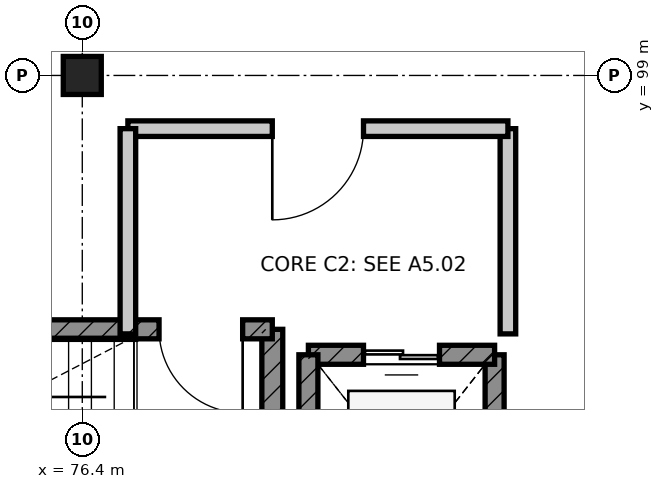
"""IFC4 building model, lengths in metres.
Left out: names, types, materials, properties, quantities, classifications, styles, units other than length and angle.
Written with IfcOpenShell. Run it as: python <this file> out.ifc"""

import sys

from ifc_helpers import new_model, si_unit, direction, frame, frame_2d, origin, origin_2d, place, context, subcontext, project, spatial, rectangle, extrude, element, fill, save


model = new_model("IFC4")
c1 = context("Model", 3, precision=1e-05, world=origin(), true_north=direction((0.0, 1.0)))
c2 = subcontext(c1, "Body", "Model", "MODEL_VIEW")
j1 = project(units=[si_unit("LENGTHUNIT", "METRE"), si_unit("PLANEANGLEUNIT", "RADIAN")], contexts=[c1])
p1 = place(None, origin())
s1 = spatial("IfcSite", under=j1, at=p1, CompositionType="ELEMENT")
p2 = place(p1, origin())
s2 = spatial("IfcBuilding", under=s1, at=p2, CompositionType="ELEMENT")
p3 = place(p2, frame((0.0, 0.0, 40.8)))
s3 = spatial("IfcBuildingStorey", under=s2, at=p3, CompositionType="ELEMENT", Elevation=40.8)
p4 = place(p3, frame((76.4, 99.0, 0.0), z_axis=(0.0, 0.0, 1.0), x_axis=(1.0, 0.0, 0.0)))
e1 = element("IfcColumn", 1, at=p4, inside=s3, PredefinedType="COLUMN", context=c2, shape_type="SweptSolid", body=[
    extrude(rectangle(XDim=0.5, YDim=0.5, at=origin_2d()), origin(), (0.0, 0.0, 1.0), 3.6),
])
p5 = place(p3, frame((78.9, 92.1, 0.0), z_axis=(0.0, 0.0, 1.0), x_axis=(0.0, 1.0, 0.0)))
e2 = element("IfcWall", 2, at=p5, inside=s3, PredefinedType="SHEAR", context=c2, shape_type="SweptSolid", body=[
    extrude(rectangle(XDim=3.56, YDim=0.275, at=frame_2d((1.78, 0.0))), origin(), (0.0, 0.0, 1.0), 3.38),
])
p6 = place(p3, frame((78.9, 95.66, 0.0), z_axis=(0.0, 0.0, 1.0), x_axis=(-1.0, 0.0, 0.0)))
e3 = element("IfcWall", 3, at=p6, inside=s3, PredefinedType="SHEAR", context=c2, shape_type="SweptSolid", body=[
    extrude(rectangle(XDim=8.4, YDim=0.25, at=frame_2d((4.2, 0.0))), origin(), (0.0, 0.0, 1.0), 3.38),
])
p7 = place(p6, frame((0.39, 0.0, 0.0)))
e4 = element("IfcOpeningElement", 4, at=p7, cuts=e3, PredefinedType="OPENING", context=c2, shape_type="SweptSolid", body=[
    extrude(rectangle(XDim=1.1, YDim=2.1, at=frame_2d((0.55, 1.05))), frame((0.0, 0.135, 0.0), z_axis=(0.0, -1.0, 0.0), x_axis=(1.0, 0.0, 0.0)), (0.0, 0.0, 1.0), 0.27),
])
p8 = place(p3, frame((81.825, 92.275, 0.0), z_axis=(0.0, 0.0, 1.0), x_axis=(0.0, 1.0, 0.0)))
e5 = element("IfcWall", 5, at=p8, inside=s3, PredefinedType="SHEAR", context=c2, shape_type="SweptSolid", body=[
    extrude(rectangle(XDim=3.05, YDim=0.25, at=frame_2d((1.525, 0.0))), origin(), (0.0, 0.0, 1.0), 3.38),
])
p9 = place(p3, frame((81.825, 95.325, 0.0), z_axis=(0.0, 0.0, 1.0), x_axis=(-1.0, 0.0, 0.0)))
e6 = element("IfcWall", 6, at=p9, inside=s3, PredefinedType="SHEAR", context=c2, shape_type="SweptSolid", body=[
    extrude(rectangle(XDim=2.45, YDim=0.25, at=frame_2d((1.225, 0.0))), origin(), (0.0, 0.0, 1.0), 3.38),
])
p10 = place(p9, frame((0.725, 0.0, 0.0)))
e7 = element("IfcOpeningElement", 7, at=p10, cuts=e6, PredefinedType="OPENING", context=c2, shape_type="SweptSolid", body=[
    extrude(rectangle(XDim=1.0, YDim=2.15, at=frame_2d((0.5, 1.075))), frame((0.0, 0.135, 0.0), z_axis=(0.0, -1.0, 0.0), x_axis=(1.0, 0.0, 0.0)), (0.0, 0.0, 1.0), 0.27),
])
p11 = place(p3, frame((79.375, 95.325, 0.0), z_axis=(0.0, 0.0, 1.0), x_axis=(0.0, -1.0, 0.0)))
e8 = element("IfcWall", 8, at=p11, inside=s3, PredefinedType="SHEAR", context=c2, shape_type="SweptSolid", body=[
    extrude(rectangle(XDim=3.05, YDim=0.25, at=frame_2d((1.525, 0.0))), origin(), (0.0, 0.0, 1.0), 3.38),
])
p12 = place(p3, frame((82.0, 95.6, 0.0), z_axis=(0.0, 0.0, 1.0), x_axis=(0.0, 1.0, 0.0)))
e9 = element("IfcWall", 9, at=p12, inside=s3, PredefinedType="PARTITIONING", context=c2, shape_type="SweptSolid", body=[
    extrude(rectangle(XDim=2.7, YDim=0.205, at=frame_2d((1.35, 0.0))), origin(), (0.0, 0.0, 1.0), 3.38),
])
p13 = place(p3, frame((82.0, 98.3, 0.0), z_axis=(0.0, 0.0, 1.0), x_axis=(-1.0, 0.0, 0.0)))
e10 = element("IfcWall", 10, at=p13, inside=s3, PredefinedType="PARTITIONING", context=c2, shape_type="SweptSolid", body=[
    extrude(rectangle(XDim=5.0, YDim=0.205, at=frame_2d((2.5, 0.0))), origin(), (0.0, 0.0, 1.0), 3.38),
])
p14 = place(p13, frame((1.9, 0.0, 0.0)))
e11 = element("IfcOpeningElement", 11, at=p14, cuts=e10, PredefinedType="OPENING", context=c2, shape_type="SweptSolid", body=[
    extrude(rectangle(XDim=1.2, YDim=2.1, at=frame_2d((0.6, 1.05))), frame((0.0, 0.113, 0.0), z_axis=(0.0, -1.0, 0.0), x_axis=(1.0, 0.0, 0.0)), (0.0, 0.0, 1.0), 0.225),
])
p15 = place(p3, frame((77.0, 98.3, 0.0), z_axis=(0.0, 0.0, 1.0), x_axis=(0.0, -1.0, 0.0)))
e12 = element("IfcWall", 12, at=p15, inside=s3, PredefinedType="PARTITIONING", context=c2, shape_type="SweptSolid", body=[
    extrude(rectangle(XDim=2.7, YDim=0.205, at=frame_2d((1.35, 0.0))), origin(), (0.0, 0.0, 1.0), 3.38),
])
p16 = place(p7, origin())
e13 = element("IfcDoor", 13, at=p16, inside=s3, OperationType="SINGLE_SWING_LEFT", PredefinedType="DOOR", context=c2, shape_type="SweptSolid", body=[
    extrude(rectangle(XDim=1.1, YDim=2.1, at=frame_2d((0.55, 1.05))), frame((0.0, 0.025, 0.0), z_axis=(0.0, -1.0, 0.0), x_axis=(1.0, 0.0, 0.0)), (0.0, 0.0, 1.0), 0.05),
])
fill(e4, e13)
p17 = place(p10, origin())
e14 = element("IfcDoor", 14, at=p17, inside=s3, OperationType="DOUBLE_DOOR_SLIDING", PredefinedType="DOOR", context=c2, shape_type="SweptSolid", body=[
    extrude(rectangle(XDim=1.0, YDim=2.15, at=frame_2d((0.5, 1.075))), frame((0.0, 0.025, 0.0), z_axis=(0.0, -1.0, 0.0), x_axis=(1.0, 0.0, 0.0)), (0.0, 0.0, 1.0), 0.05),
])
fill(e7, e14)
p18 = place(p14, origin())
e15 = element("IfcDoor", 15, at=p18, inside=s3, OperationType="SINGLE_SWING_RIGHT", PredefinedType="DOOR", context=c2, shape_type="SweptSolid", body=[
    extrude(rectangle(XDim=1.2, YDim=2.1, at=frame_2d((0.6, 1.05))), frame((0.0, 0.025, 0.0), z_axis=(0.0, -1.0, 0.0), x_axis=(1.0, 0.0, 0.0)), (0.0, 0.0, 1.0), 0.05),
])
fill(e11, e15)
save(model, sys.argv[1])
